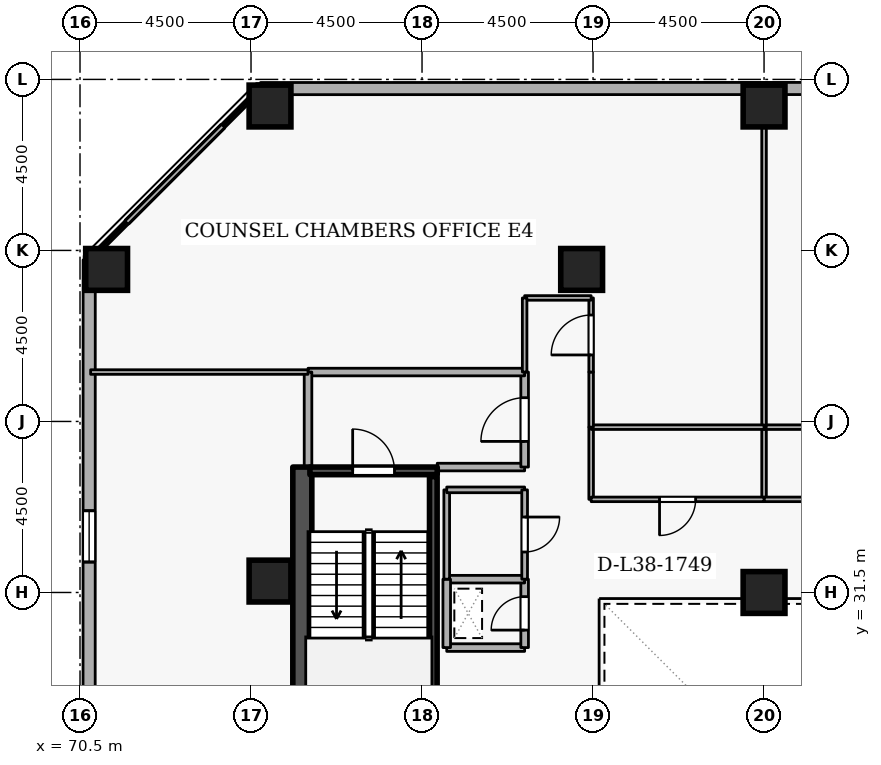
"""IFC4 building model, lengths in metres.
Left out: names, types, materials, properties, quantities, classifications, styles, units other than length and angle.
Written with IfcOpenShell. Run it as: python <this file> out.ifc"""

import sys

from ifc_helpers import new_model, si_unit, direction, frame, frame_2d, origin, origin_2d, place, context, subcontext, project, spatial, rectangle, extrude, element, fill, save


model = new_model("IFC4")
c1 = context("Model", 3, precision=1e-05, world=origin(), true_north=direction((0.0, 1.0)))
c2 = subcontext(c1, "Body", "Model", "MODEL_VIEW")
j1 = project(units=[si_unit("LENGTHUNIT", "METRE"), si_unit("PLANEANGLEUNIT", "RADIAN")], contexts=[c1])
p1 = place(None, origin())
s1 = spatial("IfcSite", under=j1, at=p1, CompositionType="ELEMENT")
p2 = place(p1, origin())
s2 = spatial("IfcBuilding", under=s1, at=p2, CompositionType="ELEMENT")
p3 = place(p2, frame((0.0, 0.0, 145.5)))
s3 = spatial("IfcBuildingStorey", under=s2, at=p3, CompositionType="ELEMENT", Elevation=145.5)
p4 = place(p3, frame((76.35, 19.2, 0.0), z_axis=(0.0, 0.0, 1.0), x_axis=(0.0, 1.0, 0.0)))
e1 = element("IfcWall", 1, at=p4, inside=s3, PredefinedType="SHEAR", context=c2, shape_type="SweptSolid", body=[
    extrude(rectangle(XDim=15.6, YDim=0.5, at=frame_2d((7.8, 0.0))), origin(), (0.0, 0.0, 1.0), 3.6),
])
for number, where, z_axis, x_axis in (
    (2, (88.5, 44.3, 0.0), (0.0, 0.0, 1.0), (1.0, 0.0, 0.0)),
    (3, (75.5, 44.3, 0.0), (0.0, 0.0, 1.0), (1.0, 0.0, 0.0)),
    (4, (71.2, 40.0, 0.0), (0.0, 0.0, 1.0), (1.0, 0.0, 0.0)),
    (5, (83.7, 40.0, 0.0), (0.0, 0.0, 1.0), (1.0, 0.0, 0.0)),
    (6, (75.5, 31.8, 0.0), (0.0, 0.0, 1.0), (1.0, 0.0, 0.0)),
    (7, (88.5, 31.5, 0.0), (0.0, 0.0, 1.0), (1.0, 0.0, 0.0)),
):
    element("IfcColumn", number, at=place(p3, frame(where, z_axis=z_axis, x_axis=x_axis)), inside=s3, PredefinedType="COLUMN", context=c2, shape_type="SweptSolid", body=[
        extrude(rectangle(XDim=1.1, YDim=1.1, at=origin_2d()), origin(), (0.0, 0.0, 1.0), 3.6),
    ])
p5 = place(p3, frame((109.681, 44.765, 0.0), z_axis=(0.0, 0.0, 1.0), x_axis=(-0.999999983007, -0.000184351399, 0.0)))
e8 = element("IfcWall", 8, at=p5, inside=s3, PredefinedType="STANDARD", context=c2, shape_type="SweptSolid", body=[
    extrude(rectangle(XDim=34.432, YDim=0.32, at=frame_2d((17.216, 0.0))), origin(), (0.0, 0.0, 1.0), 2.22),
])
p6 = place(p5, frame((1.8, 0.0, 0.72)))
e9 = element("IfcOpeningElement", 9, at=p6, cuts=e8, PredefinedType="OPENING", context=c2, shape_type="SweptSolid", body=[
    extrude(rectangle(XDim=1.35, YDim=1.05, at=frame_2d((0.675, 0.525))), frame((0.0, 0.17, 0.0), z_axis=(0.0, -1.0, 0.0), x_axis=(1.0, 0.0, 0.0)), (0.0, 0.0, 1.0), 0.34),
])
p7 = place(p3, frame((70.742, 40.251, 0.0), z_axis=(0.0, 0.0, 1.0), x_axis=(-0.000184351399, -0.999999983007, 0.0)))
e10 = element("IfcWall", 10, at=p7, inside=s3, PredefinedType="STANDARD", context=c2, shape_type="SweptSolid", body=[
    extrude(rectangle(XDim=34.432, YDim=0.32, at=frame_2d((17.216, 0.0))), origin(), (0.0, 0.0, 1.0), 2.22),
])
p8 = place(p7, frame((6.6, 0.0, 0.72)))
e11 = element("IfcOpeningElement", 11, at=p8, cuts=e10, PredefinedType="OPENING", context=c2, shape_type="SweptSolid", body=[
    extrude(rectangle(XDim=1.35, YDim=1.05, at=frame_2d((0.675, 0.525))), frame((0.0, 0.17, 0.0), z_axis=(0.0, -1.0, 0.0), x_axis=(1.0, 0.0, 0.0)), (0.0, 0.0, 1.0), 0.34),
])
p9 = place(p7, frame((16.2, 0.0, 0.72)))
e12 = element("IfcOpeningElement", 12, at=p9, cuts=e10, PredefinedType="OPENING", context=c2, shape_type="SweptSolid", body=[
    extrude(rectangle(XDim=1.35, YDim=1.05, at=frame_2d((0.675, 0.525))), frame((0.0, 0.17, 0.0), z_axis=(0.0, -1.0, 0.0), x_axis=(1.0, 0.0, 0.0)), (0.0, 0.0, 1.0), 0.34),
])
p10 = place(p7, frame((21.0, 0.0, 0.72)))
e13 = element("IfcOpeningElement", 13, at=p10, cuts=e10, PredefinedType="OPENING", context=c2, shape_type="SweptSolid", body=[
    extrude(rectangle(XDim=1.35, YDim=1.05, at=frame_2d((0.675, 0.525))), frame((0.0, 0.17, 0.0), z_axis=(0.0, -1.0, 0.0), x_axis=(1.0, 0.0, 0.0)), (0.0, 0.0, 1.0), 0.34),
])
p11 = place(p7, frame((30.6, 0.0, 0.72)))
e14 = element("IfcOpeningElement", 14, at=p11, cuts=e10, PredefinedType="OPENING", context=c2, shape_type="SweptSolid", body=[
    extrude(rectangle(XDim=1.35, YDim=1.05, at=frame_2d((0.675, 0.525))), frame((0.0, 0.17, 0.0), z_axis=(0.0, -1.0, 0.0), x_axis=(1.0, 0.0, 0.0)), (0.0, 0.0, 1.0), 0.34),
])
p12 = place(p3, frame((76.55, 34.7, 0.0), z_axis=(0.0, 0.0, 1.0), x_axis=(1.0, 0.0, 0.0)))
e15 = element("IfcWall", 15, at=p12, inside=s3, PredefinedType="SHEAR", context=c2, shape_type="SweptSolid", body=[
    extrude(rectangle(XDim=3.35, YDim=0.2, at=frame_2d((1.675, 0.0))), origin(), (0.0, 0.0, 1.0), 3.6),
])
p13 = place(p12, frame((1.125, 0.0, 0.0)))
e16 = element("IfcOpeningElement", 16, at=p13, cuts=e15, PredefinedType="OPENING", context=c2, shape_type="SweptSolid", body=[
    extrude(rectangle(XDim=1.1, YDim=2.1, at=frame_2d((0.55, 1.05))), frame((0.0, 0.11, 0.0), z_axis=(0.0, -1.0, 0.0), x_axis=(1.0, 0.0, 0.0)), (0.0, 0.0, 1.0), 0.22),
])
p14 = place(p3, frame((79.797, 27.45, 0.0), z_axis=(0.0, 0.0, 1.0), x_axis=(0.0, 1.0, 0.0)))
e17 = element("IfcWall", 17, at=p14, inside=s3, PredefinedType="SHEAR", context=c2, shape_type="SweptSolid", body=[
    extrude(rectangle(XDim=7.1, YDim=0.2, at=frame_2d((3.55, 0.0))), origin(), (0.0, 0.0, 1.0), 3.6),
])
p15 = place(p3, frame((79.9, 34.8, 0.0), z_axis=(0.0, 0.0, 1.0), x_axis=(1.0, 0.0, 0.0)))
e18 = element("IfcWall", 18, at=p15, inside=s3, PredefinedType="STANDARD", context=c2, shape_type="SweptSolid", body=[
    extrude(rectangle(XDim=2.3, YDim=0.2, at=frame_2d((1.15, 0.0))), origin(), (0.0, 0.0, 1.0), 2.505),
])
p16 = place(p3, frame((82.2, 34.8, 0.0), z_axis=(0.0, 0.0, 1.0), x_axis=(0.0, 1.0, 0.0)))
e19 = element("IfcWall", 19, at=p16, inside=s3, PredefinedType="STANDARD", context=c2, shape_type="SweptSolid", body=[
    extrude(rectangle(XDim=2.5, YDim=0.2, at=frame_2d((1.25, 0.0))), origin(), (0.0, 0.0, 1.0), 3.3),
])
p17 = place(p16, frame((0.675, 0.0, 0.0)))
e20 = element("IfcOpeningElement", 20, at=p17, cuts=e19, PredefinedType="OPENING", context=c2, shape_type="SweptSolid", body=[
    extrude(rectangle(XDim=1.15, YDim=2.1, at=frame_2d((0.575, 1.05))), frame((0.0, 0.11, 0.0), z_axis=(0.0, -1.0, 0.0), x_axis=(1.0, 0.0, 0.0)), (0.0, 0.0, 1.0), 0.22),
])
p18 = place(p3, frame((82.2, 37.3, 0.0), z_axis=(0.0, 0.0, 1.0), x_axis=(-1.0, 0.0, 0.0)))
e21 = element("IfcWall", 21, at=p18, inside=s3, PredefinedType="STANDARD", context=c2, shape_type="SweptSolid", body=[
    extrude(rectangle(XDim=5.7, YDim=0.2, at=frame_2d((2.85, 0.0))), origin(), (0.0, 0.0, 1.0), 3.3),
])
p19 = place(p3, frame((76.5, 37.3, 0.0), z_axis=(0.0, 0.0, 1.0), x_axis=(0.0, -1.0, 0.0)))
e22 = element("IfcWall", 22, at=p19, inside=s3, PredefinedType="STANDARD", context=c2, shape_type="SweptSolid", body=[
    extrude(rectangle(XDim=2.5, YDim=0.2, at=frame_2d((1.25, 0.0))), origin(), (0.0, 0.0, 1.0), 3.3),
])
p20 = place(p3, frame((80.15, 30.05, 0.0), z_axis=(0.0, 0.0, 1.0), x_axis=(1.0, 0.0, 0.0)))
e23 = element("IfcWall", 23, at=p20, inside=s3, PredefinedType="STANDARD", context=c2, shape_type="SweptSolid", body=[
    extrude(rectangle(XDim=2.05, YDim=0.2, at=frame_2d((1.025, 0.0))), origin(), (0.0, 0.0, 1.0), 3.3),
])
p21 = place(p3, frame((82.2, 30.05, 0.0), z_axis=(0.0, 0.0, 1.0), x_axis=(0.0, 1.0, 0.0)))
e24 = element("IfcWall", 24, at=p21, inside=s3, PredefinedType="STANDARD", context=c2, shape_type="SweptSolid", body=[
    extrude(rectangle(XDim=1.8, YDim=0.2, at=frame_2d((0.9, 0.0))), origin(), (0.0, 0.0, 1.0), 3.3),
])
p22 = place(p21, frame((0.46, 0.0, 0.0)))
e25 = element("IfcOpeningElement", 25, at=p22, cuts=e24, PredefinedType="OPENING", context=c2, shape_type="SweptSolid", body=[
    extrude(rectangle(XDim=0.88, YDim=2.04, at=frame_2d((0.44, 1.02))), frame((0.0, 0.11, 0.0), z_axis=(0.0, -1.0, 0.0), x_axis=(1.0, 0.0, 0.0)), (0.0, 0.0, 1.0), 0.22),
])
p23 = place(p3, frame((82.2, 31.85, 0.0), z_axis=(0.0, 0.0, 1.0), x_axis=(-1.0, 0.0, 0.0)))
e26 = element("IfcWall", 26, at=p23, inside=s3, PredefinedType="STANDARD", context=c2, shape_type="SweptSolid", body=[
    extrude(rectangle(XDim=2.05, YDim=0.2, at=frame_2d((1.025, 0.0))), origin(), (0.0, 0.0, 1.0), 3.3),
])
p24 = place(p3, frame((80.15, 31.85, 0.0), z_axis=(0.0, 0.0, 1.0), x_axis=(0.0, -1.0, 0.0)))
e27 = element("IfcWall", 27, at=p24, inside=s3, PredefinedType="STANDARD", context=c2, shape_type="SweptSolid", body=[
    extrude(rectangle(XDim=1.8, YDim=0.2, at=frame_2d((0.9, 0.0))), origin(), (0.0, 0.0, 1.0), 3.3),
])
p25 = place(p3, frame((80.15, 31.85, 0.0), z_axis=(0.0, 0.0, 1.0), x_axis=(0.0, 1.0, 0.0)))
e28 = element("IfcWall", 28, at=p25, inside=s3, PredefinedType="PARTITIONING", context=c2, shape_type="SweptSolid", body=[
    extrude(rectangle(XDim=2.35, YDim=0.15, at=frame_2d((1.175, 0.0))), origin(), (0.0, 0.0, 1.0), 3.3),
])
p26 = place(p3, frame((80.15, 34.2, 0.0), z_axis=(0.0, 0.0, 1.0), x_axis=(1.0, 0.0, 0.0)))
e29 = element("IfcWall", 29, at=p26, inside=s3, PredefinedType="PARTITIONING", context=c2, shape_type="SweptSolid", body=[
    extrude(rectangle(XDim=2.05, YDim=0.15, at=frame_2d((1.025, 0.0))), origin(), (0.0, 0.0, 1.0), 2.505),
])
p27 = place(p3, frame((82.2, 34.2, 0.0), z_axis=(0.0, 0.0, 1.0), x_axis=(0.0, -1.0, 0.0)))
e30 = element("IfcWall", 30, at=p27, inside=s3, PredefinedType="PARTITIONING", context=c2, shape_type="SweptSolid", body=[
    extrude(rectangle(XDim=2.35, YDim=0.15, at=frame_2d((1.175, 0.0))), origin(), (0.0, 0.0, 1.0), 3.3),
])
p28 = place(p27, frame((0.715, 0.0, 0.0)))
e31 = element("IfcOpeningElement", 31, at=p28, cuts=e30, PredefinedType="OPENING", context=c2, shape_type="SweptSolid", body=[
    extrude(rectangle(XDim=0.92, YDim=2.08, at=frame_2d((0.46, 1.04))), frame((0.0, 0.085, 0.0), z_axis=(0.0, -1.0, 0.0), x_axis=(1.0, 0.0, 0.0)), (0.0, 0.0, 1.0), 0.17),
])
p29 = place(p3, frame((88.5, 33.95, 0.0), z_axis=(0.0, 0.0, 1.0), x_axis=(0.0, 1.0, 0.0)))
e32 = element("IfcWall", 32, at=p29, inside=s3, PredefinedType="PARTITIONING", context=c2, shape_type="SweptSolid", body=[
    extrude(rectangle(XDim=1.9, YDim=0.12, at=frame_2d((0.95, 0.0))), origin(), (0.0, 0.0, 1.0), 1.685),
])
p30 = place(p3, frame((88.5, 35.85, 0.0), z_axis=(0.0, 0.0, 1.0), x_axis=(1.0, 0.0, 0.0)))
e33 = element("IfcWall", 33, at=p30, inside=s3, PredefinedType="PARTITIONING", context=c2, shape_type="SweptSolid", body=[
    extrude(rectangle(XDim=4.55, YDim=0.12, at=frame_2d((2.275, 0.0))), origin(), (0.0, 0.0, 1.0), 3.3),
])
p31 = place(p3, frame((93.05, 33.95, 0.0), z_axis=(0.0, 0.0, 1.0), x_axis=(-1.0, 0.0, 0.0)))
e34 = element("IfcWall", 34, at=p31, inside=s3, PredefinedType="PARTITIONING", context=c2, shape_type="SweptSolid", body=[
    extrude(rectangle(XDim=4.55, YDim=0.12, at=frame_2d((2.275, 0.0))), origin(), (0.0, 0.0, 1.0), 3.3),
])
p32 = place(p31, frame((1.8, 0.0, 0.0)))
e35 = element("IfcOpeningElement", 35, at=p32, cuts=e34, PredefinedType="OPENING", context=c2, shape_type="SweptSolid", body=[
    extrude(rectangle(XDim=0.95, YDim=2.1, at=frame_2d((0.475, 1.05))), frame((0.0, 0.07, 0.0), z_axis=(0.0, -1.0, 0.0), x_axis=(1.0, 0.0, 0.0)), (0.0, 0.0, 1.0), 0.14),
])
p33 = place(p3, frame((88.5, 35.85, 0.0), z_axis=(0.0, 0.0, 1.0), x_axis=(0.0, 1.0, 0.0)))
e36 = element("IfcWall", 36, at=p33, inside=s3, PredefinedType="PARTITIONING", context=c2, shape_type="SweptSolid", body=[
    extrude(rectangle(XDim=8.87, YDim=0.12, at=frame_2d((4.435, 0.0))), origin(), (0.0, 0.0, 1.0), 1.685),
])
p34 = place(p3, frame((83.95, 33.95, 0.0), z_axis=(0.0, 0.0, 1.0), x_axis=(0.0, 1.0, 0.0)))
e37 = element("IfcWall", 37, at=p34, inside=s3, PredefinedType="PARTITIONING", context=c2, shape_type="SweptSolid", body=[
    extrude(rectangle(XDim=1.9, YDim=0.12, at=frame_2d((0.95, 0.0))), origin(), (0.0, 0.0, 1.0), 3.3),
])
p35 = place(p3, frame((83.95, 35.85, 0.0), z_axis=(0.0, 0.0, 1.0), x_axis=(1.0, 0.0, 0.0)))
e38 = element("IfcWall", 38, at=p35, inside=s3, PredefinedType="PARTITIONING", context=c2, shape_type="SweptSolid", body=[
    extrude(rectangle(XDim=4.55, YDim=0.12, at=frame_2d((2.275, 0.0))), origin(), (0.0, 0.0, 1.0), 3.3),
])
p36 = place(p3, frame((88.5, 33.95, 0.0), z_axis=(0.0, 0.0, 1.0), x_axis=(-1.0, 0.0, 0.0)))
e39 = element("IfcWall", 39, at=p36, inside=s3, PredefinedType="PARTITIONING", context=c2, shape_type="SweptSolid", body=[
    extrude(rectangle(XDim=4.55, YDim=0.12, at=frame_2d((2.275, 0.0))), origin(), (0.0, 0.0, 1.0), 3.3),
])
p37 = place(p36, frame((1.8, 0.0, 0.0)))
e40 = element("IfcOpeningElement", 40, at=p37, cuts=e39, PredefinedType="OPENING", context=c2, shape_type="SweptSolid", body=[
    extrude(rectangle(XDim=0.95, YDim=2.1, at=frame_2d((0.475, 1.05))), frame((0.0, 0.07, 0.0), z_axis=(0.0, -1.0, 0.0), x_axis=(1.0, 0.0, 0.0)), (0.0, 0.0, 1.0), 0.14),
])
p38 = place(p3, frame((83.95, 35.85, 0.0), z_axis=(0.0, 0.0, 1.0), x_axis=(0.0, 1.0, 0.0)))
e41 = element("IfcWall", 41, at=p38, inside=s3, PredefinedType="PARTITIONING", context=c2, shape_type="SweptSolid", body=[
    extrude(rectangle(XDim=1.45, YDim=0.12, at=frame_2d((0.725, 0.0))), origin(), (0.0, 0.0, 1.0), 3.3),
])
p39 = place(p3, frame((83.95, 37.3, 0.0), z_axis=(0.0, 0.0, 1.0), x_axis=(0.0, 1.0, 0.0)))
e42 = element("IfcWall", 42, at=p39, inside=s3, PredefinedType="PARTITIONING", context=c2, shape_type="SweptSolid", body=[
    extrude(rectangle(XDim=1.95, YDim=0.12, at=frame_2d((0.975, 0.0))), origin(), (0.0, 0.0, 1.0), 3.3),
])
p40 = place(p39, frame((0.45, 0.0, 0.0)))
e43 = element("IfcOpeningElement", 43, at=p40, cuts=e42, PredefinedType="OPENING", context=c2, shape_type="SweptSolid", body=[
    extrude(rectangle(XDim=1.05, YDim=2.1, at=frame_2d((0.525, 1.05))), frame((0.0, 0.07, 0.0), z_axis=(0.0, -1.0, 0.0), x_axis=(1.0, 0.0, 0.0)), (0.0, 0.0, 1.0), 0.14),
])
p41 = place(p3, frame((83.95, 39.25, 0.0), z_axis=(0.0, 0.0, 1.0), x_axis=(-1.0, 0.0, 0.0)))
e44 = element("IfcWall", 44, at=p41, inside=s3, PredefinedType="PARTITIONING", context=c2, shape_type="SweptSolid", body=[
    extrude(rectangle(XDim=1.75, YDim=0.12, at=frame_2d((0.875, 0.0))), origin(), (0.0, 0.0, 1.0), 3.3),
])
p42 = place(p3, frame((82.2, 39.25, 0.0), z_axis=(0.0, 0.0, 1.0), x_axis=(0.0, -1.0, 0.0)))
e45 = element("IfcWall", 45, at=p42, inside=s3, PredefinedType="PARTITIONING", context=c2, shape_type="SweptSolid", body=[
    extrude(rectangle(XDim=1.95, YDim=0.12, at=frame_2d((0.975, 0.0))), origin(), (0.0, 0.0, 1.0), 3.3),
])
p43 = place(p3, frame((76.5, 37.3, 0.0), z_axis=(0.0, 0.0, 1.0), x_axis=(-1.0, 0.0, 0.0)))
e46 = element("IfcWall", 46, at=p43, inside=s3, PredefinedType="PARTITIONING", context=c2, shape_type="SweptSolid", body=[
    extrude(rectangle(XDim=5.72, YDim=0.12, at=frame_2d((2.86, 0.0))), origin(), (0.0, 0.0, 1.0), 3.3),
])
p44 = place(p3, frame((70.78, 40.287, 0.0), z_axis=(0.0, 0.0, 1.0), x_axis=(0.707106781187, 0.707106781187, 0.0)))
e47 = element("IfcWall", 47, at=p44, inside=s3, PredefinedType="PARTITIONING", context=c2, shape_type="SweptSolid", body=[
    extrude(rectangle(XDim=6.269, YDim=0.12, at=frame_2d((3.134, 0.0))), origin(), (0.0, 0.0, 1.0), 3.3),
])
p45 = place(p8, origin())
e48 = element("IfcWindow", 48, at=p45, inside=s3, PartitioningType="SINGLE_PANEL", PredefinedType="WINDOW", context=c2, shape_type="SweptSolid", body=[
    extrude(rectangle(XDim=1.35, YDim=1.05, at=frame_2d((0.675, 0.525))), frame((0.0, 0.03, 0.0), z_axis=(0.0, -1.0, 0.0), x_axis=(1.0, 0.0, 0.0)), (0.0, 0.0, 1.0), 0.06),
])
fill(e11, e48)
p46 = place(p13, origin())
e49 = element("IfcDoor", 49, at=p46, inside=s3, OperationType="SINGLE_SWING_LEFT", PredefinedType="DOOR", context=c2, shape_type="SweptSolid", body=[
    extrude(rectangle(XDim=1.1, YDim=2.1, at=frame_2d((0.55, 1.05))), frame((0.0, 0.025, 0.0), z_axis=(0.0, -1.0, 0.0), x_axis=(1.0, 0.0, 0.0)), (0.0, 0.0, 1.0), 0.05),
])
fill(e16, e49)
p47 = place(p17, origin())
e50 = element("IfcDoor", 50, at=p47, inside=s3, OperationType="SINGLE_SWING_LEFT", PredefinedType="DOOR", context=c2, shape_type="SweptSolid", body=[
    extrude(rectangle(XDim=1.15, YDim=2.1, at=frame_2d((0.575, 1.05))), frame((0.0, 0.025, 0.0), z_axis=(0.0, -1.0, 0.0), x_axis=(1.0, 0.0, 0.0)), (0.0, 0.0, 1.0), 0.05),
])
fill(e20, e50)
p48 = place(p22, origin())
e51 = element("IfcDoor", 51, at=p48, inside=s3, OperationType="SINGLE_SWING_LEFT", PredefinedType="DOOR", context=c2, shape_type="SweptSolid", body=[
    extrude(rectangle(XDim=0.88, YDim=2.04, at=frame_2d((0.44, 1.02))), frame((0.0, 0.025, 0.0), z_axis=(0.0, -1.0, 0.0), x_axis=(1.0, 0.0, 0.0)), (0.0, 0.0, 1.0), 0.05),
])
fill(e25, e51)
p49 = place(p28, origin())
e52 = element("IfcDoor", 52, at=p49, inside=s3, OperationType="SINGLE_SWING_LEFT", PredefinedType="DOOR", context=c2, shape_type="SweptSolid", body=[
    extrude(rectangle(XDim=0.92, YDim=2.08, at=frame_2d((0.46, 1.04))), frame((0.0, 0.025, 0.0), z_axis=(0.0, -1.0, 0.0), x_axis=(1.0, 0.0, 0.0)), (0.0, 0.0, 1.0), 0.05),
])
fill(e31, e52)
p50 = place(p37, origin())
e53 = element("IfcDoor", 53, at=p50, inside=s3, OperationType="SINGLE_SWING_RIGHT", PredefinedType="DOOR", context=c2, shape_type="SweptSolid", body=[
    extrude(rectangle(XDim=0.95, YDim=2.1, at=frame_2d((0.475, 1.05))), frame((0.0, 0.025, 0.0), z_axis=(0.0, -1.0, 0.0), x_axis=(1.0, 0.0, 0.0)), (0.0, 0.0, 1.0), 0.05),
])
fill(e40, e53)
p51 = place(p40, origin())
e54 = element("IfcDoor", 54, at=p51, inside=s3, OperationType="SINGLE_SWING_LEFT", PredefinedType="DOOR", context=c2, shape_type="SweptSolid", body=[
    extrude(rectangle(XDim=1.05, YDim=2.1, at=frame_2d((0.525, 1.05))), frame((0.0, 0.025, 0.0), z_axis=(0.0, -1.0, 0.0), x_axis=(1.0, 0.0, 0.0)), (0.0, 0.0, 1.0), 0.05),
])
fill(e43, e54)
save(model, sys.argv[1])
